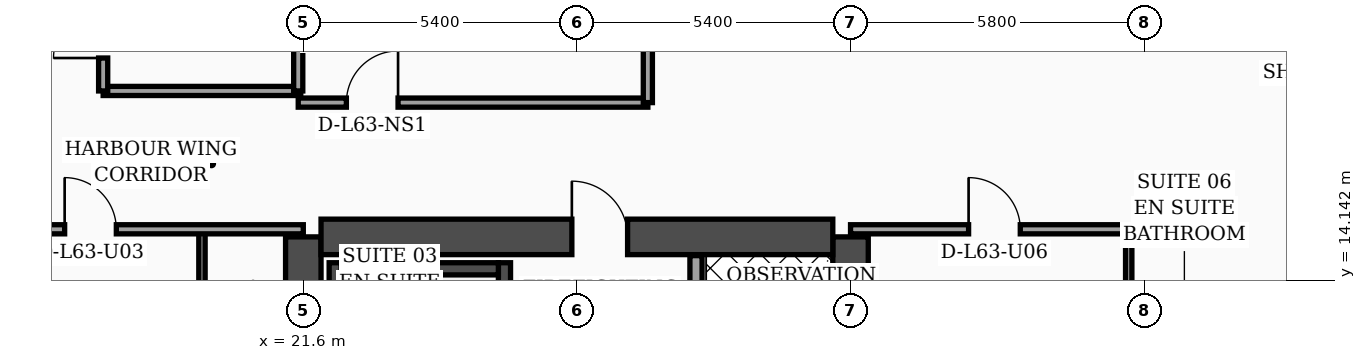
"""IFC4 building model, lengths in metres.
Left out: names, types, materials, properties, quantities, classifications, styles, units other than length and angle.
Written with IfcOpenShell. Run it as: python <this file> out.ifc"""

import sys

from ifc_helpers import new_model, si_unit, direction, frame, frame_2d, origin, place, context, subcontext, project, spatial, rectangle, extrude, element, fill, save


model = new_model("IFC4")
c1 = context("Model", 3, precision=1e-05, world=origin(), true_north=direction((0.0, 1.0)))
c2 = subcontext(c1, "Body", "Model", "MODEL_VIEW")
j1 = project(units=[si_unit("LENGTHUNIT", "METRE"), si_unit("PLANEANGLEUNIT", "RADIAN")], contexts=[c1])
p1 = place(None, origin())
s1 = spatial("IfcSite", under=j1, at=p1, CompositionType="ELEMENT")
p2 = place(p1, origin())
s2 = spatial("IfcBuilding", under=s1, at=p2, CompositionType="ELEMENT")
p3 = place(p2, frame((0.0, 0.0, 255.2)))
s3 = spatial("IfcBuildingStorey", under=s2, at=p3, CompositionType="ELEMENT", Elevation=255.2)
for number, where, z_axis, x_axis in (
    (1, (21.6, 4.6, 0.0), (0.0, 0.0, 1.0), (0.0, 1.0, 0.0)),
    (2, (32.4, 4.6, 0.0), (0.0, 0.0, 1.0), (0.0, 1.0, 0.0)),
):
    element("IfcWall", number, at=place(p3, frame(where, z_axis=z_axis, x_axis=x_axis)), inside=s3, PredefinedType="SHEAR", context=c2, shape_type="SweptSolid", body=[
        extrude(rectangle(XDim=10.4, YDim=0.7, at=frame_2d((5.2, 0.0))), origin(), (0.0, 0.0, 1.0), 3.56),
    ])
p4 = place(p3, frame((21.95, 15.0, 0.0), z_axis=(0.0, 0.0, 1.0), x_axis=(1.0, 0.0, 0.0)))
e3 = element("IfcWall", 3, at=p4, inside=s3, PredefinedType="SHEAR", context=c2, shape_type="SweptSolid", body=[
    extrude(rectangle(XDim=10.1, YDim=0.7, at=frame_2d((5.05, 0.0))), origin(), (0.0, 0.0, 1.0), 3.56),
])
p5 = place(p4, frame((4.95, 0.0, 0.0)))
e4 = element("IfcOpeningElement", 4, at=p5, cuts=e3, PredefinedType="OPENING", context=c2, shape_type="SweptSolid", body=[
    extrude(rectangle(XDim=1.1, YDim=2.2, at=frame_2d((0.55, 1.1))), frame((0.0, 0.36, 0.0), z_axis=(0.0, -1.0, 0.0), x_axis=(1.0, 0.0, 0.0)), (0.0, 0.0, 1.0), 0.72),
])
p6 = place(p3, frame((22.23, 4.95, 0.0), z_axis=(0.0, 0.0, 1.0), x_axis=(0.0, 1.0, 0.0)))
e5 = element("IfcWall", 5, at=p6, inside=s3, PredefinedType="SOLIDWALL", context=c2, shape_type="SweptSolid", body=[
    extrude(rectangle(XDim=9.54, YDim=0.24, at=frame_2d((4.77, 0.0))), origin(), (0.0, 0.0, 1.0), 3.56),
])
p7 = place(p3, frame((25.57, 4.95, 0.0), z_axis=(0.0, 0.0, 1.0), x_axis=(0.0, 1.0, 0.0)))
e6 = element("IfcWall", 6, at=p7, inside=s3, PredefinedType="SOLIDWALL", context=c2, shape_type="SweptSolid", body=[
    extrude(rectangle(XDim=9.54, YDim=0.24, at=frame_2d((4.77, 0.0))), origin(), (0.0, 0.0, 1.0), 3.56),
])
p8 = place(p7, frame((0.35, 0.0, 0.0)))
e7 = element("IfcOpeningElement", 7, at=p8, cuts=e6, PredefinedType="OPENING", context=c2, shape_type="SweptSolid", body=[
    extrude(rectangle(XDim=1.15, YDim=2.2, at=frame_2d((0.575, 1.1))), frame((0.0, 0.13, 0.0), z_axis=(0.0, -1.0, 0.0), x_axis=(1.0, 0.0, 0.0)), (0.0, 0.0, 1.0), 0.26),
])
p9 = place(p3, frame((22.35, 14.37, 0.0), z_axis=(0.0, 0.0, 1.0), x_axis=(1.0, 0.0, 0.0)))
e8 = element("IfcWall", 8, at=p9, inside=s3, PredefinedType="SOLIDWALL", context=c2, shape_type="SweptSolid", body=[
    extrude(rectangle(XDim=3.1, YDim=0.24, at=frame_2d((1.55, 0.0))), origin(), (0.0, 0.0, 1.0), 3.56),
])
p10 = place(p3, frame((46.63, 5.505, 0.0), z_axis=(0.0, 0.0, 1.0), x_axis=(-0.300501856448, 0.953781229775, 0.0)))
e9 = element("IfcWall", 9, at=p10, inside=s3, PredefinedType="SOLIDWALL", context=c2, shape_type="SweptSolid", body=[
    extrude(rectangle(XDim=30.814, YDim=0.32, at=frame_2d((15.407, 0.0))), origin(), (0.0, 0.0, 1.0), 3.56),
])
p11 = place(p10, frame((18.796, 0.0, 0.0)))
e10 = element("IfcOpeningElement", 10, at=p11, cuts=e9, PredefinedType="OPENING", context=c2, shape_type="SweptSolid", body=[
    extrude(rectangle(XDim=1.4, YDim=2.25, at=frame_2d((0.7, 1.125))), frame((0.0, 0.17, 0.0), z_axis=(0.0, -1.0, 0.0), x_axis=(1.0, 0.0, 0.0)), (0.0, 0.0, 1.0), 0.34),
])
p12 = place(p10, frame((4.437, 0.0, 0.7)))
e11 = element("IfcOpeningElement", 11, at=p12, cuts=e9, PredefinedType="OPENING", context=c2, shape_type="SweptSolid", body=[
    extrude(rectangle(XDim=1.6, YDim=1.65, at=frame_2d((0.8, 0.825))), frame((0.0, 0.17, 0.0), z_axis=(0.0, -1.0, 0.0), x_axis=(1.0, 0.0, 0.0)), (0.0, 0.0, 1.0), 0.34),
])
p13 = place(p10, frame((9.889, 0.0, 0.7)))
e12 = element("IfcOpeningElement", 12, at=p13, cuts=e9, PredefinedType="OPENING", context=c2, shape_type="SweptSolid", body=[
    extrude(rectangle(XDim=1.6, YDim=1.65, at=frame_2d((0.8, 0.825))), frame((0.0, 0.17, 0.0), z_axis=(0.0, -1.0, 0.0), x_axis=(1.0, 0.0, 0.0)), (0.0, 0.0, 1.0), 0.34),
])
p14 = place(p10, frame((1.6, 0.0, 0.75)))
e13 = element("IfcOpeningElement", 13, at=p14, cuts=e9, PredefinedType="OPENING", context=c2, shape_type="SweptSolid", body=[
    extrude(rectangle(XDim=1.5, YDim=1.6, at=frame_2d((0.75, 0.8))), frame((0.0, 0.17, 0.0), z_axis=(0.0, -1.0, 0.0), x_axis=(1.0, 0.0, 0.0)), (0.0, 0.0, 1.0), 0.34),
])
p15 = place(p10, frame((7.8, 0.0, 0.75)))
e14 = element("IfcOpeningElement", 14, at=p15, cuts=e9, PredefinedType="OPENING", context=c2, shape_type="SweptSolid", body=[
    extrude(rectangle(XDim=1.5, YDim=1.6, at=frame_2d((0.75, 0.8))), frame((0.0, 0.17, 0.0), z_axis=(0.0, -1.0, 0.0), x_axis=(1.0, 0.0, 0.0)), (0.0, 0.0, 1.0), 0.34),
])
p16 = place(p10, frame((11.95, 0.0, 0.75)))
e15 = element("IfcOpeningElement", 15, at=p16, cuts=e9, PredefinedType="OPENING", context=c2, shape_type="SweptSolid", body=[
    extrude(rectangle(XDim=1.5, YDim=1.6, at=frame_2d((0.75, 0.8))), frame((0.0, 0.17, 0.0), z_axis=(0.0, -1.0, 0.0), x_axis=(1.0, 0.0, 0.0)), (0.0, 0.0, 1.0), 0.34),
])
p17 = place(p10, frame((14.0, 0.0, 0.75)))
e16 = element("IfcOpeningElement", 16, at=p17, cuts=e9, PredefinedType="OPENING", context=c2, shape_type="SweptSolid", body=[
    extrude(rectangle(XDim=1.5, YDim=1.6, at=frame_2d((0.75, 0.8))), frame((0.0, 0.17, 0.0), z_axis=(0.0, -1.0, 0.0), x_axis=(1.0, 0.0, 0.0)), (0.0, 0.0, 1.0), 0.34),
])
p18 = place(p10, frame((16.55, 0.0, 0.75)))
e17 = element("IfcOpeningElement", 17, at=p18, cuts=e9, PredefinedType="OPENING", context=c2, shape_type="SweptSolid", body=[
    extrude(rectangle(XDim=1.5, YDim=1.6, at=frame_2d((0.75, 0.8))), frame((0.0, 0.17, 0.0), z_axis=(0.0, -1.0, 0.0), x_axis=(1.0, 0.0, 0.0)), (0.0, 0.0, 1.0), 0.34),
])
p19 = place(p10, frame((20.75, 0.0, 0.75)))
e18 = element("IfcOpeningElement", 18, at=p19, cuts=e9, PredefinedType="OPENING", context=c2, shape_type="SweptSolid", body=[
    extrude(rectangle(XDim=1.5, YDim=1.6, at=frame_2d((0.75, 0.8))), frame((0.0, 0.17, 0.0), z_axis=(0.0, -1.0, 0.0), x_axis=(1.0, 0.0, 0.0)), (0.0, 0.0, 1.0), 0.34),
])
p20 = place(p10, frame((23.3, 0.0, 0.75)))
e19 = element("IfcOpeningElement", 19, at=p20, cuts=e9, PredefinedType="OPENING", context=c2, shape_type="SweptSolid", body=[
    extrude(rectangle(XDim=1.5, YDim=1.6, at=frame_2d((0.75, 0.8))), frame((0.0, 0.17, 0.0), z_axis=(0.0, -1.0, 0.0), x_axis=(1.0, 0.0, 0.0)), (0.0, 0.0, 1.0), 0.34),
])
p21 = place(p10, frame((26.4, 0.0, 0.75)))
e20 = element("IfcOpeningElement", 20, at=p21, cuts=e9, PredefinedType="OPENING", context=c2, shape_type="SweptSolid", body=[
    extrude(rectangle(XDim=1.5, YDim=1.6, at=frame_2d((0.75, 0.8))), frame((0.0, 0.17, 0.0), z_axis=(0.0, -1.0, 0.0), x_axis=(1.0, 0.0, 0.0)), (0.0, 0.0, 1.0), 0.34),
])
p22 = place(p3, frame((29.35, 4.97, 0.0), z_axis=(0.0, 0.0, 1.0), x_axis=(0.0, 1.0, 0.0)))
e21 = element("IfcWall", 21, at=p22, inside=s3, PredefinedType="SOLIDWALL", context=c2, shape_type="SweptSolid", body=[
    extrude(rectangle(XDim=9.66, YDim=0.24, at=frame_2d((4.83, 0.0))), origin(), (0.0, 0.0, 1.0), 3.56),
])
p23 = place(p22, frame((0.55, 0.0, 0.0)))
e22 = element("IfcOpeningElement", 22, at=p23, cuts=e21, PredefinedType="OPENING", context=c2, shape_type="SweptSolid", body=[
    extrude(rectangle(XDim=1.3, YDim=2.35, at=frame_2d((0.65, 1.175))), frame((0.0, 0.13, 0.0), z_axis=(0.0, -1.0, 0.0), x_axis=(1.0, 0.0, 0.0)), (0.0, 0.0, 1.0), 0.26),
])
p24 = place(p3, frame((19.6, 2.44, 0.0), z_axis=(0.0, 0.0, 1.0), x_axis=(0.0, 1.0, 0.0)))
e23 = element("IfcWall", 23, at=p24, inside=s3, PredefinedType="PARTITIONING", context=c2, shape_type="SweptSolid", body=[
    extrude(rectangle(XDim=12.71, YDim=0.125, at=frame_2d((6.355, 0.0))), origin(), (0.0, 0.0, 1.0), 2.59),
])
p25 = place(p24, frame((4.34, 0.0, 0.0)))
e24 = element("IfcOpeningElement", 24, at=p25, cuts=e23, PredefinedType="OPENING", context=c2, shape_type="SweptSolid", body=[
    extrude(rectangle(XDim=0.96, YDim=2.2, at=frame_2d((0.48, 1.1))), frame((0.0, 0.073, 0.0), z_axis=(0.0, -1.0, 0.0), x_axis=(1.0, 0.0, 0.0)), (0.0, 0.0, 1.0), 0.145),
])
p26 = place(p24, frame((10.18, 0.0, 0.0)))
e25 = element("IfcOpeningElement", 25, at=p26, cuts=e23, PredefinedType="OPENING", context=c2, shape_type="SweptSolid", body=[
    extrude(rectangle(XDim=0.9, YDim=2.15, at=frame_2d((0.45, 1.075))), frame((0.0, 0.073, 0.0), z_axis=(0.0, -1.0, 0.0), x_axis=(1.0, 0.0, 0.0)), (0.0, 0.0, 1.0), 0.145),
])
p27 = place(p3, frame((15.15, 15.15, 0.0), z_axis=(0.0, 0.0, 1.0), x_axis=(1.0, 0.0, 0.0)))
e26 = element("IfcWall", 26, at=p27, inside=s3, PredefinedType="PARTITIONING", context=c2, shape_type="SweptSolid", body=[
    extrude(rectangle(XDim=6.45, YDim=0.18, at=frame_2d((3.225, 0.0))), origin(), (0.0, 0.0, 1.0), 2.59),
])
p28 = place(p27, frame((1.74, 0.0, 0.0)))
e27 = element("IfcOpeningElement", 27, at=p28, cuts=e26, PredefinedType="OPENING", context=c2, shape_type="SweptSolid", body=[
    extrude(rectangle(XDim=1.02, YDim=2.2, at=frame_2d((0.51, 1.1))), frame((0.0, 0.1, 0.0), z_axis=(0.0, -1.0, 0.0), x_axis=(1.0, 0.0, 0.0)), (0.0, 0.0, 1.0), 0.2),
])
p29 = place(p3, frame((17.65, 17.88, 0.0), z_axis=(0.0, 0.0, 1.0), x_axis=(1.0, 0.0, 0.0)))
e28 = element("IfcWall", 28, at=p29, inside=s3, PredefinedType="PARTITIONING", context=c2, shape_type="SweptSolid", body=[
    extrude(rectangle(XDim=3.9, YDim=0.18, at=frame_2d((1.95, 0.0))), origin(), (0.0, 0.0, 1.0), 3.56),
])
p30 = place(p3, frame((21.5, 17.88, 0.0), z_axis=(0.0, 0.0, 1.0), x_axis=(0.0, 1.0, 0.0)))
e29 = element("IfcWall", 29, at=p30, inside=s3, PredefinedType="PARTITIONING", context=c2, shape_type="SweptSolid", body=[
    extrude(rectangle(XDim=6.44, YDim=0.18, at=frame_2d((3.22, 0.0))), origin(), (0.0, 0.0, 1.0), 3.09),
])
p31 = place(p3, frame((17.65, 17.88, 0.0), z_axis=(0.0, 0.0, 1.0), x_axis=(0.0, 1.0, 0.0)))
e30 = element("IfcWall", 30, at=p31, inside=s3, PredefinedType="PARTITIONING", context=c2, shape_type="SweptSolid", body=[
    extrude(rectangle(XDim=6.44, YDim=0.18, at=frame_2d((3.22, 0.0))), origin(), (0.0, 0.0, 1.0), 3.09),
])
p32 = place(p31, frame((0.65, 0.0, 0.0)))
e31 = element("IfcOpeningElement", 31, at=p32, cuts=e30, PredefinedType="OPENING", context=c2, shape_type="SweptSolid", body=[
    extrude(rectangle(XDim=0.98, YDim=2.15, at=frame_2d((0.49, 1.075))), frame((0.0, 0.1, 0.0), z_axis=(0.0, -1.0, 0.0), x_axis=(1.0, 0.0, 0.0)), (0.0, 0.0, 1.0), 0.2),
])
p33 = place(p31, frame((3.97, 0.0, 0.0)))
e32 = element("IfcOpeningElement", 32, at=p33, cuts=e30, PredefinedType="OPENING", context=c2, shape_type="SweptSolid", body=[
    extrude(rectangle(XDim=0.96, YDim=2.2, at=frame_2d((0.48, 1.1))), frame((0.0, 0.1, 0.0), z_axis=(0.0, -1.0, 0.0), x_axis=(1.0, 0.0, 0.0)), (0.0, 0.0, 1.0), 0.2),
])
p34 = place(p3, frame((37.89, 2.44, 0.0), z_axis=(0.0, 0.0, 1.0), x_axis=(0.0, 1.0, 0.0)))
e33 = element("IfcWall", 33, at=p34, inside=s3, PredefinedType="PARTITIONING", context=c2, shape_type="SweptSolid", body=[
    extrude(rectangle(XDim=12.71, YDim=0.125, at=frame_2d((6.355, 0.0))), origin(), (0.0, 0.0, 1.0), 2.99),
])
p35 = place(p34, frame((4.35, 0.0, 0.0)))
e34 = element("IfcOpeningElement", 34, at=p35, cuts=e33, PredefinedType="OPENING", context=c2, shape_type="SweptSolid", body=[
    extrude(rectangle(XDim=0.96, YDim=2.2, at=frame_2d((0.48, 1.1))), frame((0.0, 0.073, 0.0), z_axis=(0.0, -1.0, 0.0), x_axis=(1.0, 0.0, 0.0)), (0.0, 0.0, 1.0), 0.145),
])
p36 = place(p34, frame((10.21, 0.0, 0.0)))
e35 = element("IfcOpeningElement", 35, at=p36, cuts=e33, PredefinedType="OPENING", context=c2, shape_type="SweptSolid", body=[
    extrude(rectangle(XDim=0.9, YDim=2.15, at=frame_2d((0.45, 1.075))), frame((0.0, 0.073, 0.0), z_axis=(0.0, -1.0, 0.0), x_axis=(1.0, 0.0, 0.0)), (0.0, 0.0, 1.0), 0.145),
])
p37 = place(p3, frame((32.4, 15.15, 0.0), z_axis=(0.0, 0.0, 1.0), x_axis=(1.0, 0.0, 0.0)))
e36 = element("IfcWall", 36, at=p37, inside=s3, PredefinedType="PARTITIONING", context=c2, shape_type="SweptSolid", body=[
    extrude(rectangle(XDim=7.6, YDim=0.18, at=frame_2d((3.8, 0.0))), origin(), (0.0, 0.0, 1.0), 2.99),
])
p38 = place(p37, frame((2.33, 0.0, 0.0)))
e37 = element("IfcOpeningElement", 37, at=p38, cuts=e36, PredefinedType="OPENING", context=c2, shape_type="SweptSolid", body=[
    extrude(rectangle(XDim=1.02, YDim=2.2, at=frame_2d((0.51, 1.1))), frame((0.0, 0.1, 0.0), z_axis=(0.0, -1.0, 0.0), x_axis=(1.0, 0.0, 0.0)), (0.0, 0.0, 1.0), 0.2),
])
p39 = place(p3, frame((21.5, 17.65, 0.0), z_axis=(0.0, 0.0, 1.0), x_axis=(1.0, 0.0, 0.0)))
e38 = element("IfcWall", 38, at=p39, inside=s3, PredefinedType="PARTITIONING", context=c2, shape_type="SweptSolid", body=[
    extrude(rectangle(XDim=6.9, YDim=0.18, at=frame_2d((3.45, 0.0))), origin(), (0.0, 0.0, 1.0), 2.99),
])
p40 = place(p39, frame((0.95, 0.0, 0.0)))
e39 = element("IfcOpeningElement", 39, at=p40, cuts=e38, PredefinedType="OPENING", context=c2, shape_type="SweptSolid", body=[
    extrude(rectangle(XDim=1.02, YDim=2.2, at=frame_2d((0.51, 1.1))), frame((0.0, 0.1, 0.0), z_axis=(0.0, -1.0, 0.0), x_axis=(1.0, 0.0, 0.0)), (0.0, 0.0, 1.0), 0.2),
])
p41 = place(p3, frame((28.4, 17.65, 0.0), z_axis=(0.0, 0.0, 1.0), x_axis=(0.0, 1.0, 0.0)))
e40 = element("IfcWall", 40, at=p41, inside=s3, PredefinedType="PARTITIONING", context=c2, shape_type="SweptSolid", body=[
    extrude(rectangle(XDim=14.67, YDim=0.18, at=frame_2d((7.335, 0.0))), origin(), (0.0, 0.0, 1.0), 2.99),
])
p42 = place(p28, origin())
e41 = element("IfcDoor", 41, at=p42, inside=s3, OperationType="SINGLE_SWING_LEFT", PredefinedType="DOOR", context=c2, shape_type="SweptSolid", body=[
    extrude(rectangle(XDim=1.02, YDim=2.2, at=frame_2d((0.51, 1.1))), frame((0.0, 0.025, 0.0), z_axis=(0.0, -1.0, 0.0), x_axis=(1.0, 0.0, 0.0)), (0.0, 0.0, 1.0), 0.05),
])
fill(e27, e41)
p43 = place(p32, origin())
e42 = element("IfcDoor", 42, at=p43, inside=s3, OperationType="SINGLE_SWING_LEFT", PredefinedType="DOOR", context=c2, shape_type="SweptSolid", body=[
    extrude(rectangle(XDim=0.98, YDim=2.15, at=frame_2d((0.49, 1.075))), frame((0.0, 0.025, 0.0), z_axis=(0.0, -1.0, 0.0), x_axis=(1.0, 0.0, 0.0)), (0.0, 0.0, 1.0), 0.05),
])
fill(e31, e42)
p44 = place(p38, origin())
e43 = element("IfcDoor", 43, at=p44, inside=s3, OperationType="SINGLE_SWING_LEFT", PredefinedType="DOOR", context=c2, shape_type="SweptSolid", body=[
    extrude(rectangle(XDim=1.02, YDim=2.2, at=frame_2d((0.51, 1.1))), frame((0.0, 0.025, 0.0), z_axis=(0.0, -1.0, 0.0), x_axis=(1.0, 0.0, 0.0)), (0.0, 0.0, 1.0), 0.05),
])
fill(e37, e43)
p45 = place(p40, origin())
e44 = element("IfcDoor", 44, at=p45, inside=s3, OperationType="SINGLE_SWING_RIGHT", PredefinedType="DOOR", context=c2, shape_type="SweptSolid", body=[
    extrude(rectangle(XDim=1.02, YDim=2.2, at=frame_2d((0.51, 1.1))), frame((0.0, 0.025, 0.0), z_axis=(0.0, -1.0, 0.0), x_axis=(1.0, 0.0, 0.0)), (0.0, 0.0, 1.0), 0.05),
])
fill(e39, e44)
p46 = place(p5, origin())
e45 = element("IfcDoor", 45, at=p46, inside=s3, OperationType="SINGLE_SWING_LEFT", PredefinedType="DOOR", context=c2, shape_type="SweptSolid", body=[
    extrude(rectangle(XDim=1.1, YDim=2.2, at=frame_2d((0.55, 1.1))), frame((0.0, 0.025, 0.0), z_axis=(0.0, -1.0, 0.0), x_axis=(1.0, 0.0, 0.0)), (0.0, 0.0, 1.0), 0.05),
])
fill(e4, e45)
save(model, sys.argv[1])
